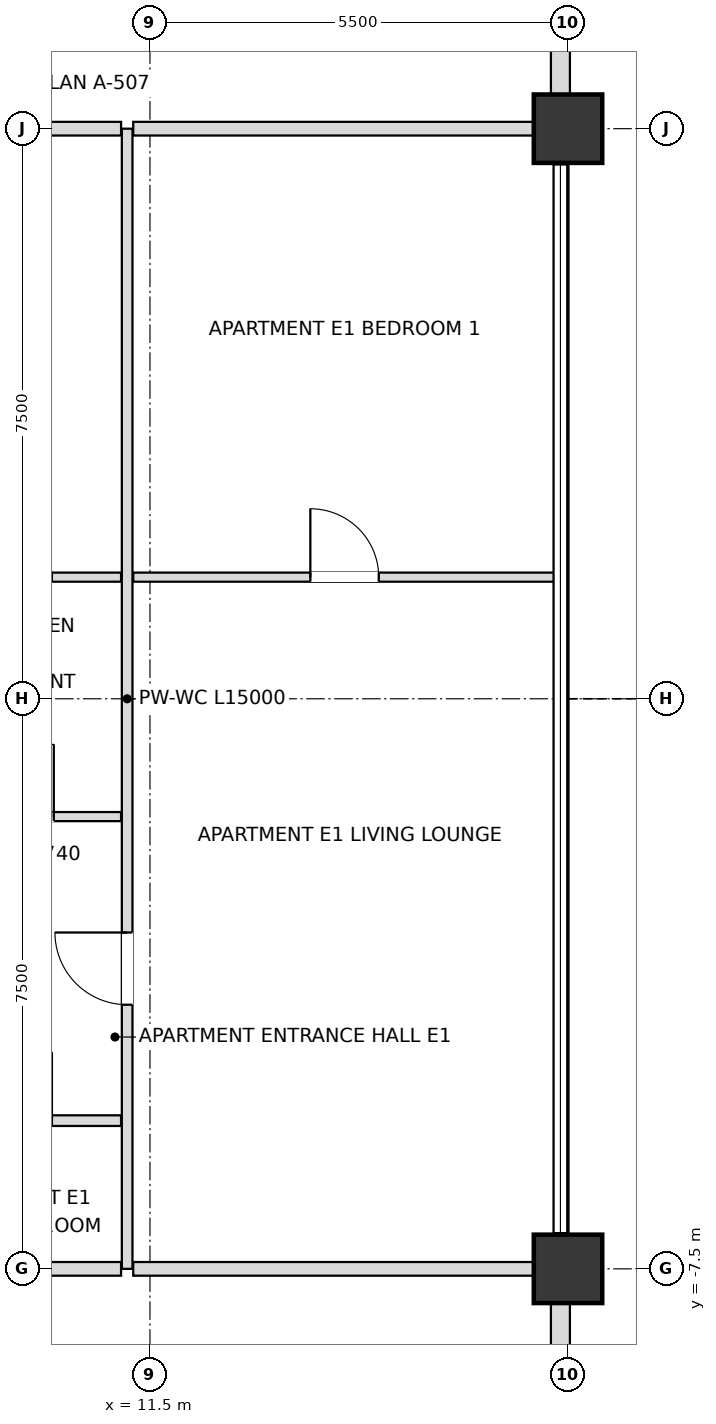
"""IFC4 building model, lengths in metres.
Left out: names, types, materials, properties, quantities, classifications, styles, units other than length and angle.
Written with IfcOpenShell. Run it as: python <this file> out.ifc"""

import sys

from ifc_helpers import new_model, si_unit, direction, frame, frame_2d, origin, origin_2d, place, context, subcontext, project, spatial, rectangle, extrude, element, fill, save


model = new_model("IFC4")
c1 = context("Model", 3, precision=1e-05, world=origin(), true_north=direction((0.0, 1.0)))
c2 = subcontext(c1, "Body", "Model", "MODEL_VIEW")
j1 = project(units=[si_unit("LENGTHUNIT", "METRE"), si_unit("PLANEANGLEUNIT", "RADIAN")], contexts=[c1])
p1 = place(None, origin())
s1 = spatial("IfcSite", under=j1, at=p1, CompositionType="ELEMENT")
p2 = place(p1, origin())
s2 = spatial("IfcBuilding", under=s1, at=p2, CompositionType="ELEMENT")
p3 = place(p2, frame((0.0, 0.0, 294.3)))
s3 = spatial("IfcBuildingStorey", under=s2, at=p3, CompositionType="ELEMENT", Elevation=294.3)
for number, where, z_axis, x_axis in (
    (1, (17.0, -7.5, 0.0), (0.0, 0.0, 1.0), (1.0, 0.0, 0.0)),
    (2, (17.0, 7.5, 0.0), (0.0, 0.0, 1.0), (1.0, 0.0, 0.0)),
):
    element("IfcColumn", number, at=place(p3, frame(where, z_axis=z_axis, x_axis=x_axis)), inside=s3, PredefinedType="USERDEFINED", context=c2, shape_type="SweptSolid", body=[
        extrude(rectangle(XDim=0.9, YDim=0.9, at=origin_2d()), origin(), (0.0, 0.0, 1.0), 3.6),
    ])
p4 = place(p3, frame((16.9, -12.555, 0.0), z_axis=(0.0, 0.0, 1.0), x_axis=(0.0, 1.0, 0.0)))
e3 = element("IfcWall", 3, at=p4, inside=s3, PredefinedType="SOLIDWALL", context=c2, shape_type="SweptSolid", body=[
    extrude(rectangle(XDim=4.61, YDim=0.25, at=frame_2d((2.305, 0.0))), origin(), (0.0, 0.0, 1.0), 2.748),
])
p5 = place(p4, frame((1.405, 0.0, 0.72)))
e4 = element("IfcOpeningElement", 4, at=p5, cuts=e3, PredefinedType="OPENING", context=c2, shape_type="SweptSolid", body=[
    extrude(rectangle(XDim=1.8, YDim=1.68, at=frame_2d((0.9, 0.84))), frame((0.0, 0.135, 0.0), z_axis=(0.0, -1.0, 0.0), x_axis=(1.0, 0.0, 0.0)), (0.0, 0.0, 1.0), 0.27),
])
p6 = place(p3, frame((16.9, 7.945, 0.0), z_axis=(0.0, 0.0, 1.0), x_axis=(0.0, 1.0, 0.0)))
e5 = element("IfcWall", 5, at=p6, inside=s3, PredefinedType="SOLIDWALL", context=c2, shape_type="SweptSolid", body=[
    extrude(rectangle(XDim=4.61, YDim=0.25, at=frame_2d((2.305, 0.0))), origin(), (0.0, 0.0, 1.0), 2.748),
])
p7 = place(p6, frame((1.405, 0.0, 0.72)))
e6 = element("IfcOpeningElement", 6, at=p7, cuts=e5, PredefinedType="OPENING", context=c2, shape_type="SweptSolid", body=[
    extrude(rectangle(XDim=1.8, YDim=1.68, at=frame_2d((0.9, 0.84))), frame((0.0, 0.135, 0.0), z_axis=(0.0, -1.0, 0.0), x_axis=(1.0, 0.0, 0.0)), (0.0, 0.0, 1.0), 0.27),
])
p8 = place(p3, frame((11.2, -7.5, 0.0), z_axis=(0.0, 0.0, 1.0), x_axis=(0.0, 1.0, 0.0)))
e7 = element("IfcWall", 7, at=p8, inside=s3, PredefinedType="PARTITIONING", context=c2, shape_type="SweptSolid", body=[
    extrude(rectangle(XDim=15.0, YDim=0.14, at=frame_2d((7.5, 0.0))), origin(), (0.0, 0.0, 1.0), 3.38),
])
p9 = place(p8, frame((3.475, 0.0, 0.0)))
e8 = element("IfcOpeningElement", 8, at=p9, cuts=e7, PredefinedType="OPENING", context=c2, shape_type="SweptSolid", body=[
    extrude(rectangle(XDim=0.95, YDim=2.1, at=frame_2d((0.475, 1.05))), frame((0.0, 0.08, 0.0), z_axis=(0.0, -1.0, 0.0), x_axis=(1.0, 0.0, 0.0)), (0.0, 0.0, 1.0), 0.16),
])
p10 = place(p3, frame((8.38, -7.5, 0.0), z_axis=(0.0, 0.0, 1.0), x_axis=(1.0, 0.0, 0.0)))
e9 = element("IfcWall", 9, at=p10, inside=s3, PredefinedType="PARTITIONING", context=c2, shape_type="SweptSolid", body=[
    extrude(rectangle(XDim=2.74, YDim=0.18, at=frame_2d((1.37, 0.0))), origin(), (0.0, 0.0, 1.0), 2.826),
])
p11 = place(p3, frame((11.28, -7.5, 0.0), z_axis=(0.0, 0.0, 1.0), x_axis=(1.0, 0.0, 0.0)))
e10 = element("IfcWall", 10, at=p11, inside=s3, PredefinedType="PARTITIONING", context=c2, shape_type="SweptSolid", body=[
    extrude(rectangle(XDim=5.62, YDim=0.18, at=frame_2d((2.81, 0.0))), origin(), (0.0, 0.0, 1.0), 2.826),
])
p12 = place(p3, frame((8.38, -5.55, 0.0), z_axis=(0.0, 0.0, 1.0), x_axis=(1.0, 0.0, 0.0)))
e11 = element("IfcWall", 11, at=p12, inside=s3, PredefinedType="PARTITIONING", context=c2, shape_type="SweptSolid", body=[
    extrude(rectangle(XDim=2.74, YDim=0.14, at=frame_2d((1.37, 0.0))), origin(), (0.0, 0.0, 1.0), 3.38),
])
p13 = place(p12, frame((0.93, 0.0, 0.0)))
e12 = element("IfcOpeningElement", 12, at=p13, cuts=e11, PredefinedType="OPENING", context=c2, shape_type="SweptSolid", body=[
    extrude(rectangle(XDim=0.9, YDim=2.1, at=frame_2d((0.45, 1.05))), frame((0.0, 0.08, 0.0), z_axis=(0.0, -1.0, 0.0), x_axis=(1.0, 0.0, 0.0)), (0.0, 0.0, 1.0), 0.16),
])
p14 = place(p3, frame((8.38, -1.55, 0.0), z_axis=(0.0, 0.0, 1.0), x_axis=(1.0, 0.0, 0.0)))
e13 = element("IfcWall", 13, at=p14, inside=s3, PredefinedType="PARTITIONING", context=c2, shape_type="SweptSolid", body=[
    extrude(rectangle(XDim=2.74, YDim=0.12, at=frame_2d((1.37, 0.0))), origin(), (0.0, 0.0, 1.0), 3.38),
])
p15 = place(p14, frame((0.905, 0.0, 0.0)))
e14 = element("IfcOpeningElement", 14, at=p15, cuts=e13, PredefinedType="OPENING", context=c2, shape_type="SweptSolid", body=[
    extrude(rectangle(XDim=0.95, YDim=2.1, at=frame_2d((0.475, 1.05))), frame((0.0, 0.07, 0.0), z_axis=(0.0, -1.0, 0.0), x_axis=(1.0, 0.0, 0.0)), (0.0, 0.0, 1.0), 0.14),
])
p16 = place(p3, frame((8.38, 1.6, 0.0), z_axis=(0.0, 0.0, 1.0), x_axis=(1.0, 0.0, 0.0)))
e15 = element("IfcWall", 15, at=p16, inside=s3, PredefinedType="PARTITIONING", context=c2, shape_type="SweptSolid", body=[
    extrude(rectangle(XDim=2.74, YDim=0.12, at=frame_2d((1.37, 0.0))), origin(), (0.0, 0.0, 1.0), 3.38),
])
p17 = place(p16, frame((0.93, 0.0, 0.0)))
e16 = element("IfcOpeningElement", 16, at=p17, cuts=e15, PredefinedType="OPENING", context=c2, shape_type="SweptSolid", body=[
    extrude(rectangle(XDim=0.9, YDim=2.1, at=frame_2d((0.45, 1.05))), frame((0.0, 0.07, 0.0), z_axis=(0.0, -1.0, 0.0), x_axis=(1.0, 0.0, 0.0)), (0.0, 0.0, 1.0), 0.14),
])
p18 = place(p3, frame((11.28, 1.6, 0.0), z_axis=(0.0, 0.0, 1.0), x_axis=(1.0, 0.0, 0.0)))
e17 = element("IfcWall", 17, at=p18, inside=s3, PredefinedType="PARTITIONING", context=c2, shape_type="SweptSolid", body=[
    extrude(rectangle(XDim=5.54, YDim=0.12, at=frame_2d((2.77, 0.0))), origin(), (0.0, 0.0, 1.0), 3.018),
])
p19 = place(p18, frame((2.33, 0.0, 0.0)))
e18 = element("IfcOpeningElement", 18, at=p19, cuts=e17, PredefinedType="OPENING", context=c2, shape_type="SweptSolid", body=[
    extrude(rectangle(XDim=0.9, YDim=2.1, at=frame_2d((0.45, 1.05))), frame((0.0, 0.07, 0.0), z_axis=(0.0, -1.0, 0.0), x_axis=(1.0, 0.0, 0.0)), (0.0, 0.0, 1.0), 0.14),
])
p20 = place(p3, frame((8.38, 7.5, 0.0), z_axis=(0.0, 0.0, 1.0), x_axis=(1.0, 0.0, 0.0)))
e19 = element("IfcWall", 19, at=p20, inside=s3, PredefinedType="PARTITIONING", context=c2, shape_type="SweptSolid", body=[
    extrude(rectangle(XDim=2.74, YDim=0.18, at=frame_2d((1.37, 0.0))), origin(), (0.0, 0.0, 1.0), 2.826),
])
p21 = place(p3, frame((11.28, 7.5, 0.0), z_axis=(0.0, 0.0, 1.0), x_axis=(1.0, 0.0, 0.0)))
e20 = element("IfcWall", 20, at=p21, inside=s3, PredefinedType="PARTITIONING", context=c2, shape_type="SweptSolid", body=[
    extrude(rectangle(XDim=5.62, YDim=0.18, at=frame_2d((2.81, 0.0))), origin(), (0.0, 0.0, 1.0), 2.826),
])
p22 = place(p15, origin())
e21 = element("IfcDoor", 21, at=p22, inside=s3, OperationType="SINGLE_SWING_RIGHT", PredefinedType="DOOR", context=c2, shape_type="SweptSolid", body=[
    extrude(rectangle(XDim=0.95, YDim=2.1, at=frame_2d((0.475, 1.05))), frame((0.0, 0.025, 0.0), z_axis=(0.0, -1.0, 0.0), x_axis=(1.0, 0.0, 0.0)), (0.0, 0.0, 1.0), 0.05),
])
fill(e14, e21)
p23 = place(p9, origin())
e22 = element("IfcDoor", 22, at=p23, inside=s3, OperationType="SINGLE_SWING_RIGHT", PredefinedType="DOOR", context=c2, shape_type="SweptSolid", body=[
    extrude(rectangle(XDim=0.95, YDim=2.1, at=frame_2d((0.475, 1.05))), frame((0.0, 0.025, 0.0), z_axis=(0.0, -1.0, 0.0), x_axis=(1.0, 0.0, 0.0)), (0.0, 0.0, 1.0), 0.05),
])
fill(e8, e22)
p24 = place(p19, origin())
e23 = element("IfcDoor", 23, at=p24, inside=s3, OperationType="SINGLE_SWING_LEFT", PredefinedType="DOOR", context=c2, shape_type="SweptSolid", body=[
    extrude(rectangle(XDim=0.9, YDim=2.1, at=frame_2d((0.45, 1.05))), frame((0.0, 0.025, 0.0), z_axis=(0.0, -1.0, 0.0), x_axis=(1.0, 0.0, 0.0)), (0.0, 0.0, 1.0), 0.05),
])
fill(e18, e23)
save(model, sys.argv[1])
